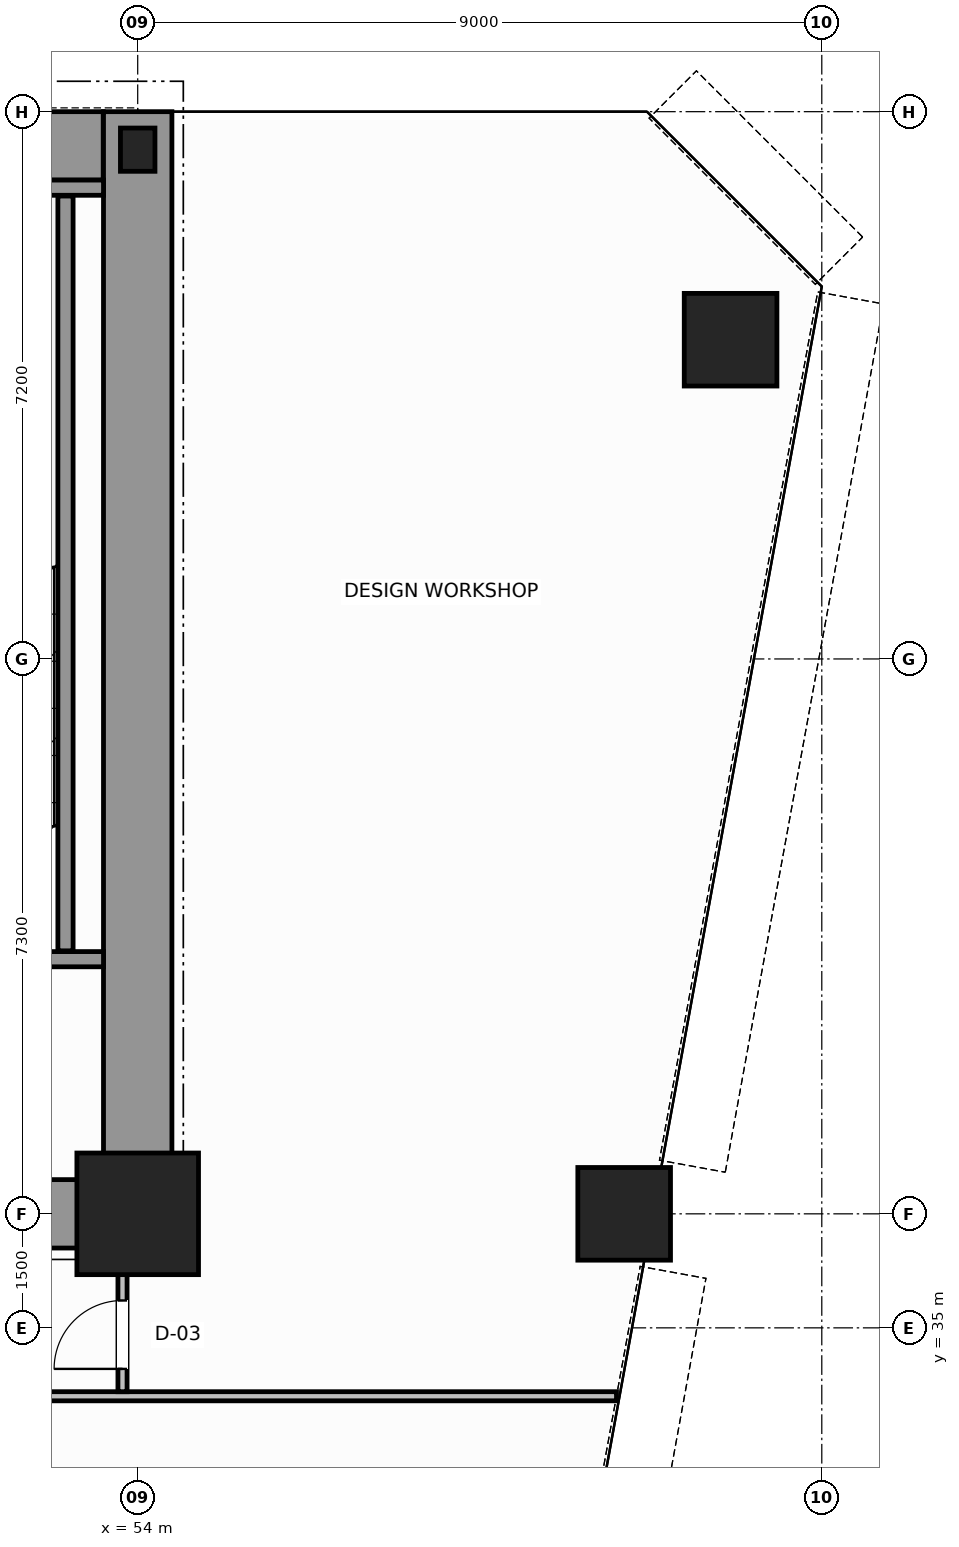
"""IFC4 building model, lengths in metres.
Left out: names, types, materials, properties, quantities, classifications, styles, units other than length and angle.
Written with IfcOpenShell. Run it as: python <this file> out.ifc"""

import sys

from ifc_helpers import new_model, si_unit, direction, frame, frame_2d, origin, origin_2d, place, context, subcontext, project, spatial, rectangle, hollow_circle, i_section, extrude, source, transform, mapped, element, fill, save


model = new_model("IFC4")
c1 = context("Model", 3, precision=1e-05, world=origin(), true_north=direction((0.0, 1.0)))
c2 = subcontext(c1, "Body", "Model", "MODEL_VIEW")
j1 = project(units=[si_unit("LENGTHUNIT", "METRE"), si_unit("PLANEANGLEUNIT", "RADIAN")], contexts=[c1])
p1 = place(None, origin())
s1 = spatial("IfcSite", under=j1, at=p1, CompositionType="ELEMENT")
p2 = place(p1, origin())
s2 = spatial("IfcBuilding", under=s1, at=p2, CompositionType="ELEMENT")
p3 = place(p2, frame((0.0, 0.0, 56.8)))
s3 = spatial("IfcBuildingStorey", under=s2, at=p3, CompositionType="ELEMENT", Elevation=56.8)
m1 = source(origin(), c2, "Body", "SweptSolid", [
    extrude(rectangle(XDim=1.6, YDim=1.6, at=origin_2d()), origin(), (0.0, 0.0, 1.0), 3.8),
])
p4 = place(p3, frame((54.0, 36.5, 0.0), z_axis=(0.0, 0.0, 1.0), x_axis=(1.0, 0.0, 0.0)))
e1 = element("IfcColumn", 1, at=p4, inside=s3, PredefinedType="COLUMN", context=c2, shape_type="MappedRepresentation", body=[
    mapped(m1, transform((0.0, 0.0, 0.0), scale=1.0)),
])
m2 = source(origin(), c2, "Body", "SweptSolid", [
    extrude(i_section(OverallWidth=0.454, OverallDepth=0.569, WebThickness=0.078, FlangeThickness=0.08, FilletRadius=0.015, at=origin_2d()), origin(), (0.0, 0.0, 1.0), 3.8),
])
p5 = place(p3, frame((54.0, 50.5, 0.0), z_axis=(0.0, 0.0, 1.0), x_axis=(1.0, 0.0, 0.0)))
e2 = element("IfcColumn", 2, at=p5, inside=s3, PredefinedType="COLUMN", context=c2, shape_type="MappedRepresentation", body=[
    mapped(m2, transform((0.0, 0.0, 0.0), scale=1.0)),
])
m3 = source(origin(), c2, "Body", "SweptSolid", [
    extrude(hollow_circle(Radius=0.61, WallThickness=0.05, at=origin_2d()), origin(), (0.0, 0.0, 1.0), 3.8),
])
for number, where, z_axis, x_axis in (
    (3, (61.8, 48.0, 0.0), (0.0, 0.0, 1.0), (1.0, 0.0, 0.0)),
    (4, (60.4, 36.5, 0.0), (0.0, 0.0, 1.0), (1.0, 0.0, 0.0)),
):
    element("IfcColumn", number, at=place(p3, frame(where, z_axis=z_axis, x_axis=x_axis)), inside=s3, PredefinedType="COLUMN", context=c2, shape_type="MappedRepresentation", body=[
        mapped(m3, transform((0.0, 0.0, 0.0), scale=1.0)),
    ])
p6 = place(p3, frame((34.002, 50.55, 0.0), z_axis=(0.0, 0.0, 1.0), x_axis=(1.0, 0.0, 0.0)))
e5 = element("IfcWall", 5, at=p6, inside=s3, PredefinedType="SHEAR", context=c2, shape_type="SweptSolid", body=[
    extrude(rectangle(XDim=19.544, YDim=0.9, at=frame_2d((9.772, 0.0))), origin(), (0.0, 0.0, 1.0), 3.8),
])
p7 = place(p3, frame((54.0, 36.5, 0.0), z_axis=(0.0, 0.0, 1.0), x_axis=(0.0, 1.0, 0.0)))
e6 = element("IfcWall", 6, at=p7, inside=s3, PredefinedType="SHEAR", context=c2, shape_type="SweptSolid", body=[
    extrude(rectangle(XDim=14.5, YDim=0.9, at=frame_2d((7.25, 0.0))), origin(), (0.0, 0.0, 1.0), 3.8),
])
p8 = place(p3, frame((49.8, 36.5, 0.0), z_axis=(0.0, 0.0, 1.0), x_axis=(1.0, 0.0, 0.0)))
e7 = element("IfcWall", 7, at=p8, inside=s3, PredefinedType="SHEAR", context=c2, shape_type="SweptSolid", body=[
    extrude(rectangle(XDim=3.73, YDim=0.9, at=frame_2d((1.865, 0.0))), origin(), (0.0, 0.0, 1.0), 2.38),
])
p9 = place(p3, frame((49.4, 39.85, 0.0), z_axis=(0.0, 0.0, 1.0), x_axis=(1.0, 0.0, 0.0)))
e8 = element("IfcWall", 8, at=p9, inside=s3, PredefinedType="SOLIDWALL", context=c2, shape_type="SweptSolid", body=[
    extrude(rectangle(XDim=4.15, YDim=0.2, at=frame_2d((2.075, 0.0))), origin(), (0.0, 0.0, 1.0), 3.8),
])
p10 = place(p9, frame((1.325, 0.0, 0.0)))
e9 = element("IfcOpeningElement", 9, at=p10, cuts=e8, PredefinedType="OPENING", context=c2, shape_type="SweptSolid", body=[
    extrude(rectangle(XDim=1.1, YDim=2.15, at=frame_2d((0.55, 1.075))), frame((0.0, 0.11, 0.0), z_axis=(0.0, -1.0, 0.0), x_axis=(1.0, 0.0, 0.0)), (0.0, 0.0, 1.0), 0.22),
])
p11 = place(p3, frame((49.4, 50.0, 0.0), z_axis=(0.0, 0.0, 1.0), x_axis=(1.0, 0.0, 0.0)))
e10 = element("IfcWall", 10, at=p11, inside=s3, PredefinedType="SOLIDWALL", context=c2, shape_type="SweptSolid", body=[
    extrude(rectangle(XDim=4.15, YDim=0.2, at=frame_2d((2.075, 0.0))), origin(), (0.0, 0.0, 1.0), 3.8),
])
p12 = place(p3, frame((53.05, 39.96, 0.0), z_axis=(0.0, 0.0, 1.0), x_axis=(0.0, 1.0, 0.0)))
e11 = element("IfcWall", 11, at=p12, inside=s3, PredefinedType="SOLIDWALL", context=c2, shape_type="SweptSolid", body=[
    extrude(rectangle(XDim=9.93, YDim=0.2, at=frame_2d((4.965, 0.0))), origin(), (0.0, 0.0, 1.0), 3.8),
])
p13 = place(p3, frame((51.86, 34.1, 0.0), z_axis=(0.0, 0.0, 1.0), x_axis=(1.0, 0.0, 0.0)))
e12 = element("IfcWall", 12, at=p13, inside=s3, PredefinedType="PARTITIONING", context=c2, shape_type="SweptSolid", body=[
    extrude(rectangle(XDim=8.439, YDim=0.12, at=frame_2d((4.22, 0.0))), origin(), (0.0, 0.0, 1.0), 3.58),
])
p14 = place(p3, frame((53.8, 34.16, 0.0), z_axis=(0.0, 0.0, 1.0), x_axis=(0.0, 1.0, 0.0)))
e13 = element("IfcWall", 13, at=p14, inside=s3, PredefinedType="PARTITIONING", context=c2, shape_type="SweptSolid", body=[
    extrude(rectangle(XDim=2.28, YDim=0.12, at=frame_2d((1.14, 0.0))), origin(), (0.0, 0.0, 1.0), 3.58),
])
p15 = place(p14, frame((0.3, 0.0, 0.0)))
e14 = element("IfcOpeningElement", 14, at=p15, cuts=e13, PredefinedType="OPENING", context=c2, shape_type="SweptSolid", body=[
    extrude(rectangle(XDim=0.9, YDim=2.15, at=frame_2d((0.45, 1.075))), frame((0.0, 0.07, 0.0), z_axis=(0.0, -1.0, 0.0), x_axis=(1.0, 0.0, 0.0)), (0.0, 0.0, 1.0), 0.14),
])
m4 = source(origin(), c2, "Body", "SweptSolid", [
    extrude(rectangle(XDim=0.9, YDim=2.15, at=frame_2d((0.45, 1.075))), frame((0.0, 0.025, 0.0), z_axis=(0.0, -1.0, 0.0), x_axis=(1.0, 0.0, 0.0)), (0.0, 0.0, 1.0), 0.05),
])
p16 = place(p15, origin())
e15 = element("IfcDoor", 15, at=p16, inside=s3, OperationType="SINGLE_SWING_RIGHT", PredefinedType="DOOR", context=c2, shape_type="MappedRepresentation", body=[
    mapped(m4, transform((0.0, 0.0, 0.0), scale=1.0)),
])
fill(e14, e15)
save(model, sys.argv[1])
